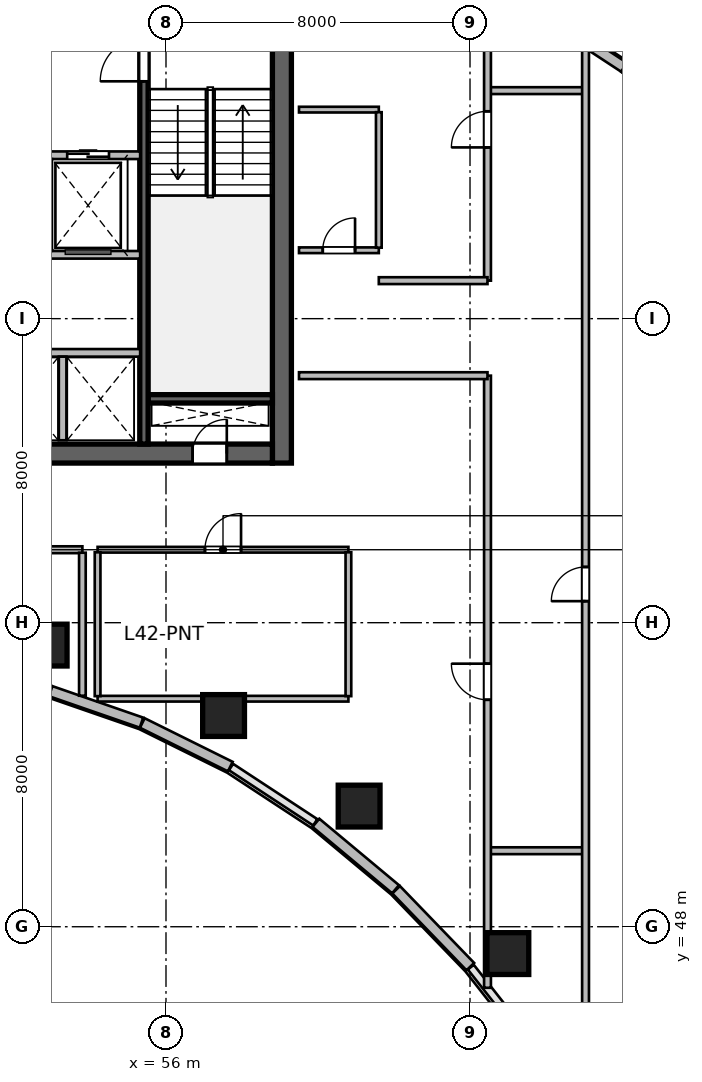
"""IFC4 building model, lengths in metres.
Left out: names, types, materials, properties, quantities, classifications, styles, units other than length and angle.
Written with IfcOpenShell. Run it as: python <this file> out.ifc"""

import sys

from ifc_helpers import new_model, si_unit, direction, frame, frame_2d, origin, origin_2d, place, context, subcontext, project, spatial, rectangle, circle, extrude, source, transform, mapped, element, fill, save


model = new_model("IFC4")
c1 = context("Model", 3, precision=1e-05, world=origin(), true_north=direction((0.0, 1.0)))
c2 = subcontext(c1, "Body", "Model", "MODEL_VIEW")
j1 = project(units=[si_unit("LENGTHUNIT", "METRE"), si_unit("PLANEANGLEUNIT", "RADIAN")], contexts=[c1])
p1 = place(None, origin())
s1 = spatial("IfcSite", under=j1, at=p1, CompositionType="ELEMENT")
p2 = place(p1, origin())
s2 = spatial("IfcBuilding", under=s1, at=p2, CompositionType="ELEMENT")
p3 = place(p2, frame((0.0, 0.0, 174.0)))
s3 = spatial("IfcBuildingStorey", under=s2, at=p3, CompositionType="ELEMENT", Elevation=174.0)
m1 = source(origin(), c2, "Body", "SweptSolid", [
    extrude(rectangle(XDim=12.0, YDim=0.5, at=frame_2d((6.0, 0.0))), origin(), (0.0, 0.0, 1.0), 3.9),
])
p4 = place(p3, frame((59.05, 60.2, 0.0), z_axis=(0.0, 0.0, 1.0), x_axis=(0.0, 1.0, 0.0)))
e1 = element("IfcWall", 1, at=p4, inside=s3, PredefinedType="SHEAR", context=c2, shape_type="MappedRepresentation", body=[
    mapped(m1, transform((0.0, 0.0, 0.0), scale=1.0)),
])
m2 = source(origin(), c2, "Body", "SweptSolid", [
    extrude(rectangle(XDim=21.6, YDim=0.5, at=frame_2d((10.8, 0.0))), origin(), (0.0, 0.0, 1.0), 3.9),
])
p5 = place(p3, frame((37.2, 60.45, 0.0), z_axis=(0.0, 0.0, 1.0), x_axis=(1.0, 0.0, 0.0)))
e2 = element("IfcWall", 2, at=p5, inside=s3, PredefinedType="SHEAR", context=c2, shape_type="MappedRepresentation", body=[
    mapped(m2, transform((0.0, 0.0, 0.0), scale=1.0)),
])
p6 = place(p5, frame((1.1, 0.0, 0.0)))
e3 = element("IfcOpeningElement", 3, at=p6, cuts=e2, PredefinedType="OPENING", context=c2, shape_type="SweptSolid", body=[
    extrude(rectangle(XDim=1.15, YDim=2.15, at=frame_2d((0.575, 1.075))), frame((0.0, 0.26, 0.0), z_axis=(0.0, -1.0, 0.0), x_axis=(1.0, 0.0, 0.0)), (0.0, 0.0, 1.0), 0.52),
])
p7 = place(p5, frame((19.5, 0.0, 0.0)))
e4 = element("IfcOpeningElement", 4, at=p7, cuts=e2, PredefinedType="OPENING", context=c2, shape_type="SweptSolid", body=[
    extrude(rectangle(XDim=0.9, YDim=2.1, at=frame_2d((0.45, 1.05))), frame((0.0, 0.26, 0.0), z_axis=(0.0, -1.0, 0.0), x_axis=(1.0, 0.0, 0.0)), (0.0, 0.0, 1.0), 0.52),
])
p8 = place(p5, frame((12.02, 0.0, 0.0)))
e5 = element("IfcOpeningElement", 5, at=p8, cuts=e2, PredefinedType="OPENING", context=c2, shape_type="SweptSolid", body=[
    extrude(rectangle(XDim=1.6, YDim=2.15, at=frame_2d((0.8, 1.075))), frame((0.0, 0.26, 0.0), z_axis=(0.0, -1.0, 0.0), x_axis=(1.0, 0.0, 0.0)), (0.0, 0.0, 1.0), 0.52),
])
m3 = source(origin(), c2, "Body", "SweptSolid", [
    extrude(rectangle(XDim=3.27, YDim=0.22, at=frame_2d((1.635, 0.0))), origin(), (0.0, 0.0, 1.0), 3.9),
])
p9 = place(p3, frame((55.53, 61.89, 0.0), z_axis=(0.0, 0.0, 1.0), x_axis=(1.0, 0.0, 0.0)))
e6 = element("IfcWall", 6, at=p9, inside=s3, PredefinedType="SHEAR", context=c2, shape_type="MappedRepresentation", body=[
    mapped(m3, transform((0.0, 0.0, 0.0), scale=1.0)),
])
m4 = source(origin(), c2, "Body", "SweptSolid", [
    extrude(rectangle(XDim=11.0, YDim=0.22, at=frame_2d((5.5, 0.0))), origin(), (0.0, 0.0, 1.0), 3.9),
])
p10 = place(p3, frame((55.42, 60.7, 0.0), z_axis=(0.0, 0.0, 1.0), x_axis=(0.0, 1.0, 0.0)))
e7 = element("IfcWall", 7, at=p10, inside=s3, PredefinedType="SHEAR", context=c2, shape_type="MappedRepresentation", body=[
    mapped(m4, transform((0.0, 0.0, 0.0), scale=1.0)),
])
p11 = place(p10, frame((9.545, 0.0, 0.0)))
e8 = element("IfcOpeningElement", 8, at=p11, cuts=e7, PredefinedType="OPENING", context=c2, shape_type="SweptSolid", body=[
    extrude(rectangle(XDim=1.15, YDim=2.15, at=frame_2d((0.575, 1.075))), frame((0.0, 0.12, 0.0), z_axis=(0.0, -1.0, 0.0), x_axis=(1.0, 0.0, 0.0)), (0.0, 0.0, 1.0), 0.24),
])
m5 = source(origin(), c2, "Body", "SweptSolid", [
    extrude(circle(Radius=0.55, at=origin_2d()), origin(), (0.0, 0.0, 1.0), 3.9),
])
for number, where, z_axis, x_axis in (
    (9, (52.846, 55.411, 0.0), (0.0, 0.0, 1.0), (0.143, 0.99, 0.0)),
    (10, (57.515, 53.558, 0.0), (0.0, 0.0, 1.0), (0.289, 0.957, 0.0)),
    (11, (61.082, 51.175, 0.0), (0.0, 0.0, 1.0), (0.409, 0.912, 0.0)),
    (12, (64.996, 47.294, 0.0), (0.0, 0.0, 1.0), (0.558, 0.83, 0.0)),
):
    element("IfcColumn", number, at=place(p3, frame(where, z_axis=z_axis, x_axis=x_axis)), inside=s3, PredefinedType="COLUMN", context=c2, shape_type="MappedRepresentation", body=[
        mapped(m5, transform((0.0, 0.0, 0.0), scale=1.0)),
    ])
m6 = source(origin(), c2, "Body", "SweptSolid", [
    extrude(rectangle(XDim=2.812, YDim=0.28, at=frame_2d((1.406, 0.0))), origin(), (0.0, 0.0, 1.0), 3.65),
])
p12 = place(p3, frame((64.008, 46.95, 0.0), z_axis=(0.0, 0.0, 1.0), x_axis=(-0.694583668785, 0.719411931411, 0.0)))
e13 = element("IfcWall", 13, at=p12, inside=s3, PredefinedType="SOLIDWALL", context=c2, shape_type="MappedRepresentation", body=[
    mapped(m6, transform((0.0, 0.0, 0.0), scale=1.0)),
])
m7 = source(origin(), c2, "Body", "SweptSolid", [
    extrude(rectangle(XDim=2.729, YDim=0.28, at=frame_2d((1.365, 0.0))), origin(), (0.0, 0.0, 1.0), 3.65),
])
p13 = place(p3, frame((62.041, 48.987, 0.0), z_axis=(0.0, 0.0, 1.0), x_axis=(-0.767957284255, 0.640501061326, 0.0)))
e14 = element("IfcWall", 14, at=p13, inside=s3, PredefinedType="SOLIDWALL", context=c2, shape_type="MappedRepresentation", body=[
    mapped(m7, transform((0.0, 0.0, 0.0), scale=1.0)),
])
m8 = source(origin(), c2, "Body", "SweptSolid", [
    extrude(rectangle(XDim=2.584, YDim=0.28, at=frame_2d((1.292, 0.0))), origin(), (0.0, 0.0, 1.0), 3.65),
])
p14 = place(p3, frame((57.692, 52.213, 0.0), z_axis=(0.0, 0.0, 1.0), x_axis=(-0.895989792847, 0.44407464588, 0.0)))
e15 = element("IfcWall", 15, at=p14, inside=s3, PredefinedType="SOLIDWALL", context=c2, shape_type="MappedRepresentation", body=[
    mapped(m8, transform((0.0, 0.0, 0.0), scale=1.0)),
])
m9 = source(origin(), c2, "Body", "SweptSolid", [
    extrude(rectangle(XDim=2.53, YDim=0.28, at=frame_2d((1.265, 0.0))), origin(), (0.0, 0.0, 1.0), 3.65),
])
p15 = place(p3, frame((55.355, 53.37, 0.0), z_axis=(0.0, 0.0, 1.0), x_axis=(-0.944872429646, 0.327438683872, 0.0)))
e16 = element("IfcWall", 16, at=p15, inside=s3, PredefinedType="SOLIDWALL", context=c2, shape_type="MappedRepresentation", body=[
    mapped(m9, transform((0.0, 0.0, 0.0), scale=1.0)),
])
m10 = source(origin(), c2, "Body", "SweptSolid", [
    extrude(rectangle(XDim=4.501, YDim=0.28, at=frame_2d((2.25, 0.0))), origin(), (0.0, 0.0, 1.0), 3.65),
])
p16 = place(p3, frame((64.298, 73.08, 0.0), z_axis=(0.0, 0.0, 1.0), x_axis=(0.835984920737, -0.548752414391, 0.0)))
e17 = element("IfcWall", 17, at=p16, inside=s3, PredefinedType="SOLIDWALL", context=c2, shape_type="MappedRepresentation", body=[
    mapped(m10, transform((0.0, 0.0, 0.0), scale=1.0)),
])
m11 = source(origin(), c2, "Body", "SweptSolid", [
    extrude(rectangle(XDim=4.634, YDim=0.28, at=frame_2d((2.317, 0.0))), origin(), (0.0, 0.0, 1.0), 3.65),
])
p17 = place(p3, frame((68.061, 70.61, 0.0), z_axis=(0.0, 0.0, 1.0), x_axis=(0.767910229096, -0.640557475993, 0.0)))
e18 = element("IfcWall", 18, at=p17, inside=s3, PredefinedType="SOLIDWALL", context=c2, shape_type="MappedRepresentation", body=[
    mapped(m11, transform((0.0, 0.0, 0.0), scale=1.0)),
])
m12 = source(origin(), c2, "Body", "SweptSolid", [
    extrude(rectangle(XDim=5.62, YDim=0.2, at=frame_2d((2.81, 0.0))), origin(), (0.0, 0.0, 1.0), 3.65),
])
p18 = place(p3, frame((49.7, 68.3, 0.0), z_axis=(0.0, 0.0, 1.0), x_axis=(1.0, 0.0, 0.0)))
e19 = element("IfcWall", 19, at=p18, inside=s3, PredefinedType="SOLIDWALL", context=c2, shape_type="MappedRepresentation", body=[
    mapped(m12, transform((0.0, 0.0, 0.0), scale=1.0)),
])
p19 = place(p18, frame((1.6, 0.0, 0.0)))
e20 = element("IfcOpeningElement", 20, at=p19, cuts=e19, PredefinedType="OPENING", context=c2, shape_type="SweptSolid", body=[
    extrude(rectangle(XDim=1.1, YDim=2.15, at=frame_2d((0.55, 1.075))), frame((0.0, 0.11, 0.0), z_axis=(0.0, -1.0, 0.0), x_axis=(1.0, 0.0, 0.0)), (0.0, 0.0, 1.0), 0.22),
])
p20 = place(p18, frame((3.7, 0.0, 0.0)))
e21 = element("IfcOpeningElement", 21, at=p20, cuts=e19, PredefinedType="OPENING", context=c2, shape_type="SweptSolid", body=[
    extrude(rectangle(XDim=1.1, YDim=2.15, at=frame_2d((0.55, 1.075))), frame((0.0, 0.11, 0.0), z_axis=(0.0, -1.0, 0.0), x_axis=(1.0, 0.0, 0.0)), (0.0, 0.0, 1.0), 0.22),
])
p21 = place(p3, frame((49.7, 65.68, 0.0), z_axis=(0.0, 0.0, 1.0), x_axis=(1.0, 0.0, 0.0)))
e22 = element("IfcWall", 22, at=p21, inside=s3, PredefinedType="SOLIDWALL", context=c2, shape_type="MappedRepresentation", body=[
    mapped(m12, transform((0.0, 0.0, 0.0), scale=1.0)),
])
m13 = source(origin(), c2, "Body", "SweptSolid", [
    extrude(rectangle(XDim=4.1, YDim=0.2, at=frame_2d((2.05, 0.0))), origin(), (0.0, 0.0, 1.0), 3.65),
])
p22 = place(p3, frame((51.22, 63.1, 0.0), z_axis=(0.0, 0.0, 1.0), x_axis=(1.0, 0.0, 0.0)))
e23 = element("IfcWall", 23, at=p22, inside=s3, PredefinedType="SOLIDWALL", context=c2, shape_type="MappedRepresentation", body=[
    mapped(m13, transform((0.0, 0.0, 0.0), scale=1.0)),
])
m14 = source(origin(), c2, "Body", "SweptSolid", [
    extrude(rectangle(XDim=2.2, YDim=0.2, at=frame_2d((1.1, 0.0))), origin(), (0.0, 0.0, 1.0), 3.65),
])
p23 = place(p3, frame((53.28, 60.8, 0.0), z_axis=(0.0, 0.0, 1.0), x_axis=(0.0, 1.0, 0.0)))
e24 = element("IfcWall", 24, at=p23, inside=s3, PredefinedType="SOLIDWALL", context=c2, shape_type="MappedRepresentation", body=[
    mapped(m14, transform((0.0, 0.0, 0.0), scale=1.0)),
])
m15 = source(origin(), c2, "Body", "SweptSolid", [
    extrude(rectangle(XDim=2.1, YDim=0.15, at=frame_2d((1.05, 0.0))), origin(), (0.0, 0.0, 1.0), 3.65),
])
p24 = place(p3, frame((59.5, 65.8, 0.0), z_axis=(0.0, 0.0, 1.0), x_axis=(1.0, 0.0, 0.0)))
e25 = element("IfcWall", 25, at=p24, inside=s3, PredefinedType="PARTITIONING", context=c2, shape_type="MappedRepresentation", body=[
    mapped(m15, transform((0.0, 0.0, 0.0), scale=1.0)),
])
p25 = place(p24, frame((0.625, 0.0, 0.0)))
e26 = element("IfcOpeningElement", 26, at=p25, cuts=e25, PredefinedType="OPENING", context=c2, shape_type="SweptSolid", body=[
    extrude(rectangle(XDim=0.85, YDim=2.1, at=frame_2d((0.425, 1.05))), frame((0.0, 0.085, 0.0), z_axis=(0.0, -1.0, 0.0), x_axis=(1.0, 0.0, 0.0)), (0.0, 0.0, 1.0), 0.17),
])
p26 = place(p3, frame((59.5, 69.5, 0.0), z_axis=(0.0, 0.0, 1.0), x_axis=(1.0, 0.0, 0.0)))
e27 = element("IfcWall", 27, at=p26, inside=s3, PredefinedType="PARTITIONING", context=c2, shape_type="MappedRepresentation", body=[
    mapped(m15, transform((0.0, 0.0, 0.0), scale=1.0)),
])
m16 = source(origin(), c2, "Body", "SweptSolid", [
    extrude(rectangle(XDim=3.565, YDim=0.15, at=frame_2d((1.783, 0.0))), origin(), (0.0, 0.0, 1.0), 3.65),
])
p27 = place(p3, frame((61.6, 65.867, 0.0), z_axis=(0.0, 0.0, 1.0), x_axis=(0.0, 1.0, 0.0)))
e28 = element("IfcWall", 28, at=p27, inside=s3, PredefinedType="PARTITIONING", context=c2, shape_type="MappedRepresentation", body=[
    mapped(m16, transform((0.0, 0.0, 0.0), scale=1.0)),
])
m17 = source(origin(), c2, "Body", "SweptSolid", [
    extrude(rectangle(XDim=3.248, YDim=0.18, at=frame_2d((1.624, 0.0))), origin(), (0.0, 0.0, 1.0), 3.65),
])
p28 = place(p3, frame((50.552, 57.92, 0.0), z_axis=(0.0, 0.0, 1.0), x_axis=(1.0, 0.0, 0.0)))
e29 = element("IfcWall", 29, at=p28, inside=s3, PredefinedType="PLUMBINGWALL", context=c2, shape_type="MappedRepresentation", body=[
    mapped(m17, transform((0.0, 0.0, 0.0), scale=1.0)),
])
p29 = place(p28, frame((1.149, 0.0, 0.0)))
e30 = element("IfcOpeningElement", 30, at=p29, cuts=e29, PredefinedType="OPENING", context=c2, shape_type="SweptSolid", body=[
    extrude(rectangle(XDim=0.95, YDim=2.12, at=frame_2d((0.475, 1.06))), frame((0.0, 0.1, 0.0), z_axis=(0.0, -1.0, 0.0), x_axis=(1.0, 0.0, 0.0)), (0.0, 0.0, 1.0), 0.2),
])
m18 = source(origin(), c2, "Body", "SweptSolid", [
    extrude(rectangle(XDim=3.763, YDim=0.175, at=frame_2d((1.881, 0.0))), origin(), (0.0, 0.0, 1.0), 3.65),
])
p30 = place(p3, frame((53.8, 54.079, 0.0), z_axis=(0.0, 0.0, 1.0), x_axis=(0.0, 1.0, 0.0)))
e31 = element("IfcWall", 31, at=p30, inside=s3, PredefinedType="PARTITIONING", context=c2, shape_type="MappedRepresentation", body=[
    mapped(m18, transform((0.0, 0.0, 0.0), scale=1.0)),
])
m19 = source(origin(), c2, "Body", "SweptSolid", [
    extrude(rectangle(XDim=6.6, YDim=0.15, at=frame_2d((3.3, 0.0))), origin(), (0.0, 0.0, 1.0), 3.095),
])
p31 = place(p3, frame((54.2, 54.0, 0.0), z_axis=(0.0, 0.0, 1.0), x_axis=(1.0, 0.0, 0.0)))
e32 = element("IfcWall", 32, at=p31, inside=s3, PredefinedType="PARTITIONING", context=c2, shape_type="MappedRepresentation", body=[
    mapped(m19, transform((0.0, 0.0, 0.0), scale=1.0)),
])
m20 = source(origin(), c2, "Body", "SweptSolid", [
    extrude(rectangle(XDim=6.6, YDim=0.15, at=frame_2d((3.3, 0.0))), origin(), (0.0, 0.0, 1.0), 3.65),
])
p32 = place(p3, frame((54.2, 57.92, 0.0), z_axis=(0.0, 0.0, 1.0), x_axis=(1.0, 0.0, 0.0)))
e33 = element("IfcWall", 33, at=p32, inside=s3, PredefinedType="PARTITIONING", context=c2, shape_type="MappedRepresentation", body=[
    mapped(m20, transform((0.0, 0.0, 0.0), scale=1.0)),
])
p33 = place(p32, frame((2.825, 0.0, 0.0)))
e34 = element("IfcOpeningElement", 34, at=p33, cuts=e33, PredefinedType="OPENING", context=c2, shape_type="SweptSolid", body=[
    extrude(rectangle(XDim=0.95, YDim=2.1, at=frame_2d((0.475, 1.05))), frame((0.0, 0.085, 0.0), z_axis=(0.0, -1.0, 0.0), x_axis=(1.0, 0.0, 0.0)), (0.0, 0.0, 1.0), 0.17),
])
m21 = source(origin(), c2, "Body", "SweptSolid", [
    extrude(rectangle(XDim=3.785, YDim=0.15, at=frame_2d((1.893, 0.0))), origin(), (0.0, 0.0, 1.0), 3.65),
])
for number, where, z_axis, x_axis in (
    (35, (54.2, 54.067, 0.0), (0.0, 0.0, 1.0), (0.0, 1.0, 0.0)),
    (36, (60.8, 54.067, 0.0), (0.0, 0.0, 1.0), (0.0, 1.0, 0.0)),
):
    element("IfcWall", number, at=place(p3, frame(where, z_axis=z_axis, x_axis=x_axis)), inside=s3, PredefinedType="PARTITIONING", context=c2, shape_type="MappedRepresentation", body=[
        mapped(m21, transform((0.0, 0.0, 0.0), scale=1.0)),
    ])
m22 = source(origin(), c2, "Body", "SweptSolid", [
    extrude(rectangle(XDim=2.5, YDim=0.18, at=frame_2d((1.25, 0.0))), origin(), (0.0, 0.0, 1.0), 3.65),
])
p34 = place(p3, frame((64.5, 50.0, 0.0), z_axis=(0.0, 0.0, 1.0), x_axis=(1.0, 0.0, 0.0)))
e37 = element("IfcWall", 37, at=p34, inside=s3, PredefinedType="PLUMBINGWALL", context=c2, shape_type="MappedRepresentation", body=[
    mapped(m22, transform((0.0, 0.0, 0.0), scale=1.0)),
])
m23 = source(origin(), c2, "Body", "SweptSolid", [
    extrude(rectangle(XDim=2.5, YDim=0.18, at=frame_2d((1.25, 0.0))), origin(), (0.0, 0.0, 1.0), 3.022),
])
p35 = place(p3, frame((64.5, 70.0, 0.0), z_axis=(0.0, 0.0, 1.0), x_axis=(1.0, 0.0, 0.0)))
e38 = element("IfcWall", 38, at=p35, inside=s3, PredefinedType="PLUMBINGWALL", context=c2, shape_type="MappedRepresentation", body=[
    mapped(m23, transform((0.0, 0.0, 0.0), scale=1.0)),
])
m24 = source(origin(), c2, "Body", "SweptSolid", [
    extrude(rectangle(XDim=28.503, YDim=0.18, at=frame_2d((14.251, 0.0))), origin(), (0.0, 0.0, 1.0), 2.942),
])
p36 = place(p3, frame((67.04, 42.765, 0.0), z_axis=(0.0, 0.0, 1.0), x_axis=(0.0, 1.0, 0.0)))
e39 = element("IfcWall", 39, at=p36, inside=s3, PredefinedType="PLUMBINGWALL", context=c2, shape_type="MappedRepresentation", body=[
    mapped(m24, transform((0.0, 0.0, 0.0), scale=1.0)),
])
p37 = place(p36, frame((13.802, 0.0, 0.0)))
e40 = element("IfcOpeningElement", 40, at=p37, cuts=e39, PredefinedType="OPENING", context=c2, shape_type="SweptSolid", body=[
    extrude(rectangle(XDim=0.9, YDim=2.08, at=frame_2d((0.45, 1.04))), frame((0.0, 0.1, 0.0), z_axis=(0.0, -1.0, 0.0), x_axis=(1.0, 0.0, 0.0)), (0.0, 0.0, 1.0), 0.2),
])
m25 = source(origin(), c2, "Body", "SweptSolid", [
    extrude(rectangle(XDim=16.106, YDim=0.18, at=frame_2d((8.053, 0.0))), origin(), (0.0, 0.0, 1.0), 2.942),
])
p38 = place(p3, frame((64.46, 46.394, 0.0), z_axis=(0.0, 0.0, 1.0), x_axis=(0.0, 1.0, 0.0)))
e41 = element("IfcWall", 41, at=p38, inside=s3, PredefinedType="PLUMBINGWALL", context=c2, shape_type="MappedRepresentation", body=[
    mapped(m25, transform((0.0, 0.0, 0.0), scale=1.0)),
])
p39 = place(p38, frame((7.578, 0.0, 0.0)))
e42 = element("IfcOpeningElement", 42, at=p39, cuts=e41, PredefinedType="OPENING", context=c2, shape_type="SweptSolid", body=[
    extrude(rectangle(XDim=0.95, YDim=2.1, at=frame_2d((0.475, 1.05))), frame((0.0, 0.1, 0.0), z_axis=(0.0, -1.0, 0.0), x_axis=(1.0, 0.0, 0.0)), (0.0, 0.0, 1.0), 0.2),
])
m26 = source(origin(), c2, "Body", "SweptSolid", [
    extrude(rectangle(XDim=4.96, YDim=0.18, at=frame_2d((2.48, 0.0))), origin(), (0.0, 0.0, 1.0), 3.65),
])
p40 = place(p3, frame((59.5, 62.5, 0.0), z_axis=(0.0, 0.0, 1.0), x_axis=(1.0, 0.0, 0.0)))
e43 = element("IfcWall", 43, at=p40, inside=s3, PredefinedType="PLUMBINGWALL", context=c2, shape_type="MappedRepresentation", body=[
    mapped(m26, transform((0.0, 0.0, 0.0), scale=1.0)),
])
m27 = source(origin(), c2, "Body", "SweptSolid", [
    extrude(rectangle(XDim=7.962, YDim=0.18, at=frame_2d((3.981, 0.0))), origin(), (0.0, 0.0, 1.0), 3.65),
])
p41 = place(p3, frame((64.46, 65.0, 0.0), z_axis=(0.0, 0.0, 1.0), x_axis=(0.0, 1.0, 0.0)))
e44 = element("IfcWall", 44, at=p41, inside=s3, PredefinedType="PLUMBINGWALL", context=c2, shape_type="MappedRepresentation", body=[
    mapped(m27, transform((0.0, 0.0, 0.0), scale=1.0)),
])
p42 = place(p41, frame((3.506, 0.0, 0.0)))
e45 = element("IfcOpeningElement", 45, at=p42, cuts=e44, PredefinedType="OPENING", context=c2, shape_type="SweptSolid", body=[
    extrude(rectangle(XDim=0.95, YDim=2.1, at=frame_2d((0.475, 1.05))), frame((0.0, 0.1, 0.0), z_axis=(0.0, -1.0, 0.0), x_axis=(1.0, 0.0, 0.0)), (0.0, 0.0, 1.0), 0.2),
])
m28 = source(origin(), c2, "Body", "SweptSolid", [
    extrude(rectangle(XDim=2.86, YDim=0.18, at=frame_2d((1.43, 0.0))), origin(), (0.0, 0.0, 1.0), 3.65),
])
p43 = place(p3, frame((61.6, 65.0, 0.0), z_axis=(0.0, 0.0, 1.0), x_axis=(1.0, 0.0, 0.0)))
e46 = element("IfcWall", 46, at=p43, inside=s3, PredefinedType="PLUMBINGWALL", context=c2, shape_type="MappedRepresentation", body=[
    mapped(m28, transform((0.0, 0.0, 0.0), scale=1.0)),
])
m29 = source(origin(), c2, "Body", "SweptSolid", [
    extrude(rectangle(XDim=0.9, YDim=2.1, at=frame_2d((0.45, 1.05))), frame((0.0, 0.025, 0.0), z_axis=(0.0, -1.0, 0.0), x_axis=(1.0, 0.0, 0.0)), (0.0, 0.0, 1.0), 0.05),
])
p44 = place(p7, origin())
e47 = element("IfcDoor", 47, at=p44, inside=s3, OperationType="SINGLE_SWING_RIGHT", PredefinedType="DOOR", context=c2, shape_type="MappedRepresentation", body=[
    mapped(m29, transform((0.0, 0.0, 0.0), scale=1.0)),
])
fill(e4, e47)
m30 = source(origin(), c2, "Body", "SweptSolid", [
    extrude(rectangle(XDim=1.15, YDim=2.15, at=frame_2d((0.575, 1.075))), frame((0.0, 0.025, 0.0), z_axis=(0.0, -1.0, 0.0), x_axis=(1.0, 0.0, 0.0)), (0.0, 0.0, 1.0), 0.05),
])
p45 = place(p11, origin())
e48 = element("IfcDoor", 48, at=p45, inside=s3, OperationType="SINGLE_SWING_LEFT", PredefinedType="DOOR", context=c2, shape_type="MappedRepresentation", body=[
    mapped(m30, transform((0.0, 0.0, 0.0), scale=1.0)),
])
fill(e8, e48)
m31 = source(origin(), c2, "Body", "SweptSolid", [
    extrude(rectangle(XDim=1.1, YDim=2.15, at=frame_2d((0.55, 1.075))), frame((0.0, 0.025, 0.0), z_axis=(0.0, -1.0, 0.0), x_axis=(1.0, 0.0, 0.0)), (0.0, 0.0, 1.0), 0.05),
])
p46 = place(p20, origin())
e49 = element("IfcDoor", 49, at=p46, inside=s3, OperationType="DOUBLE_DOOR_SLIDING", PredefinedType="DOOR", context=c2, shape_type="MappedRepresentation", body=[
    mapped(m31, transform((0.0, 0.0, 0.0), scale=1.0)),
])
fill(e21, e49)
m32 = source(origin(), c2, "Body", "SweptSolid", [
    extrude(rectangle(XDim=0.85, YDim=2.1, at=frame_2d((0.425, 1.05))), frame((0.0, 0.025, 0.0), z_axis=(0.0, -1.0, 0.0), x_axis=(1.0, 0.0, 0.0)), (0.0, 0.0, 1.0), 0.05),
])
p47 = place(p25, origin())
e50 = element("IfcDoor", 50, at=p47, inside=s3, OperationType="SINGLE_SWING_RIGHT", PredefinedType="DOOR", context=c2, shape_type="MappedRepresentation", body=[
    mapped(m32, transform((0.0, 0.0, 0.0), scale=1.0)),
])
fill(e26, e50)
m33 = source(origin(), c2, "Body", "SweptSolid", [
    extrude(rectangle(XDim=0.95, YDim=2.1, at=frame_2d((0.475, 1.05))), frame((0.0, 0.025, 0.0), z_axis=(0.0, -1.0, 0.0), x_axis=(1.0, 0.0, 0.0)), (0.0, 0.0, 1.0), 0.05),
])
p48 = place(p33, origin())
e51 = element("IfcDoor", 51, at=p48, inside=s3, OperationType="SINGLE_SWING_RIGHT", PredefinedType="DOOR", context=c2, shape_type="MappedRepresentation", body=[
    mapped(m33, transform((0.0, 0.0, 0.0), scale=1.0)),
])
fill(e34, e51)
m34 = source(origin(), c2, "Body", "SweptSolid", [
    extrude(rectangle(XDim=0.9, YDim=2.08, at=frame_2d((0.45, 1.04))), frame((0.0, 0.025, 0.0), z_axis=(0.0, -1.0, 0.0), x_axis=(1.0, 0.0, 0.0)), (0.0, 0.0, 1.0), 0.05),
])
p49 = place(p37, origin())
e52 = element("IfcDoor", 52, at=p49, inside=s3, OperationType="SINGLE_SWING_LEFT", PredefinedType="DOOR", context=c2, shape_type="MappedRepresentation", body=[
    mapped(m34, transform((0.0, 0.0, 0.0), scale=1.0)),
])
fill(e40, e52)
p50 = place(p39, origin())
e53 = element("IfcDoor", 53, at=p50, inside=s3, OperationType="SINGLE_SWING_RIGHT", PredefinedType="DOOR", context=c2, shape_type="MappedRepresentation", body=[
    mapped(m33, transform((0.0, 0.0, 0.0), scale=1.0)),
])
fill(e42, e53)
p51 = place(p42, origin())
e54 = element("IfcDoor", 54, at=p51, inside=s3, OperationType="SINGLE_SWING_LEFT", PredefinedType="DOOR", context=c2, shape_type="MappedRepresentation", body=[
    mapped(m33, transform((0.0, 0.0, 0.0), scale=1.0)),
])
fill(e45, e54)
save(model, sys.argv[1])
